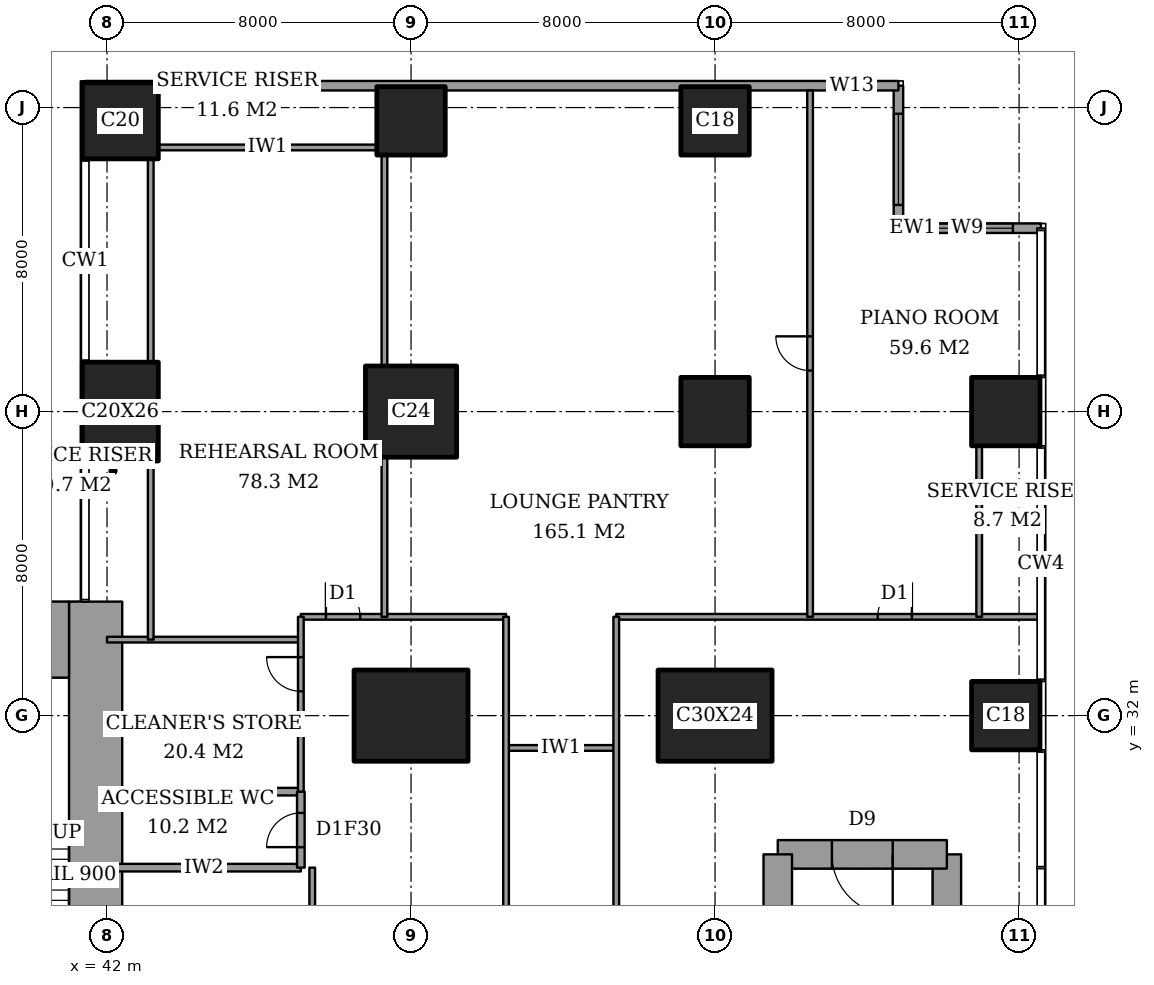
"""IFC4 building model, lengths in metres.
Left out: names, types, materials, properties, quantities, classifications, styles, units other than length and angle.
Written with IfcOpenShell. Run it as: python <this file> out.ifc"""

import sys

from ifc_helpers import new_model, si_unit, direction, frame, frame_2d, origin, origin_2d, place, context, subcontext, project, spatial, rectangle, extrude, element, fill, save


model = new_model("IFC4")
c1 = context("Model", 3, precision=1e-05, world=origin(), true_north=direction((0.0, 1.0)))
c2 = subcontext(c1, "Body", "Model", "MODEL_VIEW")
j1 = project(units=[si_unit("LENGTHUNIT", "METRE"), si_unit("PLANEANGLEUNIT", "RADIAN")], contexts=[c1])
p1 = place(None, origin())
s1 = spatial("IfcSite", under=j1, at=p1, CompositionType="ELEMENT")
p2 = place(p1, origin())
s2 = spatial("IfcBuilding", under=s1, at=p2, CompositionType="ELEMENT")
p3 = place(p2, frame((0.0, 0.0, 200.2)))
s3 = spatial("IfcBuildingStorey", under=s2, at=p3, CompositionType="ELEMENT", Elevation=200.2)
p4 = place(p3, frame((42.35, 40.0, 0.0), z_axis=(0.0, 0.0, 1.0), x_axis=(1.0, 0.0, 0.0)))
e1 = element("IfcColumn", 1, at=p4, inside=s3, PredefinedType="COLUMN", context=c2, shape_type="SweptSolid", body=[
    extrude(rectangle(XDim=2.0, YDim=2.6, at=origin_2d()), origin(), (0.0, 0.0, 1.0), 3.6),
])
p5 = place(p3, frame((42.35, 47.65, 0.0), z_axis=(0.0, 0.0, 1.0), x_axis=(1.0, 0.0, 0.0)))
e2 = element("IfcColumn", 2, at=p5, inside=s3, PredefinedType="COLUMN", context=c2, shape_type="SweptSolid", body=[
    extrude(rectangle(XDim=2.0, YDim=2.0, at=origin_2d()), origin(), (0.0, 0.0, 1.0), 3.6),
])
p6 = place(p3, frame((50.0, 32.0, 0.0), z_axis=(0.0, 0.0, 1.0), x_axis=(1.0, 0.0, 0.0)))
e3 = element("IfcColumn", 3, at=p6, inside=s3, PredefinedType="COLUMN", context=c2, shape_type="SweptSolid", body=[
    extrude(rectangle(XDim=3.0, YDim=2.4, at=origin_2d()), origin(), (0.0, 0.0, 1.0), 3.6),
])
p7 = place(p3, frame((50.0, 40.0, 0.0), z_axis=(0.0, 0.0, 1.0), x_axis=(1.0, 0.0, 0.0)))
e4 = element("IfcColumn", 4, at=p7, inside=s3, PredefinedType="COLUMN", context=c2, shape_type="SweptSolid", body=[
    extrude(rectangle(XDim=2.4, YDim=2.4, at=origin_2d()), origin(), (0.0, 0.0, 1.0), 3.6),
])
p8 = place(p3, frame((50.0, 47.65, 0.0), z_axis=(0.0, 0.0, 1.0), x_axis=(1.0, 0.0, 0.0)))
e5 = element("IfcColumn", 5, at=p8, inside=s3, PredefinedType="COLUMN", context=c2, shape_type="SweptSolid", body=[
    extrude(rectangle(XDim=1.8, YDim=1.8, at=origin_2d()), origin(), (0.0, 0.0, 1.0), 3.6),
])
p9 = place(p3, frame((58.0, 32.0, 0.0), z_axis=(0.0, 0.0, 1.0), x_axis=(1.0, 0.0, 0.0)))
e6 = element("IfcColumn", 6, at=p9, inside=s3, PredefinedType="COLUMN", context=c2, shape_type="SweptSolid", body=[
    extrude(rectangle(XDim=3.0, YDim=2.4, at=origin_2d()), origin(), (0.0, 0.0, 1.0), 3.6),
])
for number, where, z_axis, x_axis in (
    (7, (58.0, 40.0, 0.0), (0.0, 0.0, 1.0), (1.0, 0.0, 0.0)),
    (8, (58.0, 47.65, 0.0), (0.0, 0.0, 1.0), (1.0, 0.0, 0.0)),
    (9, (65.65, 32.0, 0.0), (0.0, 0.0, 1.0), (1.0, 0.0, 0.0)),
    (10, (65.65, 40.0, 0.0), (0.0, 0.0, 1.0), (1.0, 0.0, 0.0)),
):
    element("IfcColumn", number, at=place(p3, frame(where, z_axis=z_axis, x_axis=x_axis)), inside=s3, PredefinedType="COLUMN", context=c2, shape_type="SweptSolid", body=[
        extrude(rectangle(XDim=1.8, YDim=1.8, at=origin_2d()), origin(), (0.0, 0.0, 1.0), 3.6),
    ])
p10 = place(p3, frame((37.85, 34.0, 0.0), z_axis=(0.0, 0.0, 1.0), x_axis=(1.0, 0.0, 0.0)))
e11 = element("IfcWall", 11, at=p10, inside=s3, PredefinedType="SHEAR", context=c2, shape_type="SweptSolid", body=[
    extrude(rectangle(XDim=3.15, YDim=2.0, at=frame_2d((1.575, 0.0))), origin(), (0.0, 0.0, 1.0), 3.6),
])
p11 = place(p3, frame((41.7, 24.85, 0.0), z_axis=(0.0, 0.0, 1.0), x_axis=(0.0, 1.0, 0.0)))
e12 = element("IfcWall", 12, at=p11, inside=s3, PredefinedType="SHEAR", context=c2, shape_type="SweptSolid", body=[
    extrude(rectangle(XDim=10.15, YDim=1.4, at=frame_2d((5.075, 0.0))), origin(), (0.0, 0.0, 1.0), 3.6),
])
p12 = place(p3, frame((64.1, 19.65, 0.0), z_axis=(0.0, 0.0, 1.0), x_axis=(0.0, 1.0, 0.0)))
e13 = element("IfcWall", 13, at=p12, inside=s3, PredefinedType="SHEAR", context=c2, shape_type="SweptSolid", body=[
    extrude(rectangle(XDim=8.7, YDim=0.75, at=frame_2d((4.35, 0.0))), origin(), (0.0, 0.0, 1.0), 3.6),
])
p13 = place(p3, frame((64.1, 28.35, 0.0), z_axis=(0.0, 0.0, 1.0), x_axis=(-1.0, 0.0, 0.0)))
e14 = element("IfcWall", 14, at=p13, inside=s3, PredefinedType="SHEAR", context=c2, shape_type="SweptSolid", body=[
    extrude(rectangle(XDim=4.45, YDim=0.75, at=frame_2d((2.225, 0.0))), origin(), (0.0, 0.0, 1.0), 3.6),
])
p14 = place(p13, frame((1.425, 0.0, 0.0)))
e15 = element("IfcOpeningElement", 15, at=p14, cuts=e14, PredefinedType="OPENING", context=c2, shape_type="SweptSolid", body=[
    extrude(rectangle(XDim=1.6, YDim=2.1, at=frame_2d((0.8, 1.05))), frame((0.0, 0.385, 0.0), z_axis=(0.0, -1.0, 0.0), x_axis=(1.0, 0.0, 0.0)), (0.0, 0.0, 1.0), 0.77),
])
p15 = place(p3, frame((59.65, 28.35, 0.0), z_axis=(0.0, 0.0, 1.0), x_axis=(0.0, -1.0, 0.0)))
e16 = element("IfcWall", 16, at=p15, inside=s3, PredefinedType="SHEAR", context=c2, shape_type="SweptSolid", body=[
    extrude(rectangle(XDim=8.7, YDim=0.75, at=frame_2d((4.35, 0.0))), origin(), (0.0, 0.0, 1.0), 3.6),
])
p16 = place(p3, frame((66.575, 44.825, 0.0), z_axis=(0.0, 0.0, 1.0), x_axis=(-1.0, 0.0, 0.0)))
e17 = element("IfcWall", 17, at=p16, inside=s3, PredefinedType="SOLIDWALL", context=c2, shape_type="SweptSolid", body=[
    extrude(rectangle(XDim=3.75, YDim=0.25, at=frame_2d((1.875, 0.0))), origin(), (0.0, 0.0, 1.0), 3.6),
])
p17 = place(p16, frame((0.738, 0.0, 0.2)))
e18 = element("IfcOpeningElement", 18, at=p17, cuts=e17, PredefinedType="OPENING", context=c2, shape_type="SweptSolid", body=[
    extrude(rectangle(XDim=2.4, YDim=2.4, at=frame_2d((1.2, 1.2))), frame((0.0, 0.135, 0.0), z_axis=(0.0, -1.0, 0.0), x_axis=(1.0, 0.0, 0.0)), (0.0, 0.0, 1.0), 0.27),
])
p18 = place(p3, frame((62.825, 44.825, 0.0), z_axis=(0.0, 0.0, 1.0), x_axis=(0.0, 1.0, 0.0)))
e19 = element("IfcWall", 19, at=p18, inside=s3, PredefinedType="SOLIDWALL", context=c2, shape_type="SweptSolid", body=[
    extrude(rectangle(XDim=3.75, YDim=0.25, at=frame_2d((1.875, 0.0))), origin(), (0.0, 0.0, 1.0), 3.6),
])
p19 = place(p18, frame((0.613, 0.0, 0.2)))
e20 = element("IfcOpeningElement", 20, at=p19, cuts=e19, PredefinedType="OPENING", context=c2, shape_type="SweptSolid", body=[
    extrude(rectangle(XDim=2.4, YDim=2.4, at=frame_2d((1.2, 1.2))), frame((0.0, 0.135, 0.0), z_axis=(0.0, -1.0, 0.0), x_axis=(1.0, 0.0, 0.0)), (0.0, 0.0, 1.0), 0.27),
])
p20 = place(p3, frame((62.825, 48.575, 0.0), z_axis=(0.0, 0.0, 1.0), x_axis=(-1.0, 0.0, 0.0)))
e21 = element("IfcWall", 21, at=p20, inside=s3, PredefinedType="SOLIDWALL", context=c2, shape_type="SweptSolid", body=[
    extrude(rectangle(XDim=21.4, YDim=0.25, at=frame_2d((10.7, 0.0))), origin(), (0.0, 0.0, 1.0), 3.6),
])
p21 = place(p20, frame((0.625, 0.0, 0.2)))
e22 = element("IfcOpeningElement", 22, at=p21, cuts=e21, PredefinedType="OPENING", context=c2, shape_type="SweptSolid", body=[
    extrude(rectangle(XDim=1.2, YDim=2.4, at=frame_2d((0.6, 1.2))), frame((0.0, 0.135, 0.0), z_axis=(0.0, -1.0, 0.0), x_axis=(1.0, 0.0, 0.0)), (0.0, 0.0, 1.0), 0.27),
])
for number, where, z_axis, x_axis in (
    (23, (42.0, 28.0, 0.0), (0.0, 0.0, 1.0), (1.0, 0.0, 0.0)),
    (24, (42.0, 30.0, 0.0), (0.0, 0.0, 1.0), (1.0, 0.0, 0.0)),
):
    element("IfcWall", number, at=place(p3, frame(where, z_axis=z_axis, x_axis=x_axis)), inside=s3, PredefinedType="PARTITIONING", context=c2, shape_type="SweptSolid", body=[
        extrude(rectangle(XDim=5.1, YDim=0.2, at=frame_2d((2.55, 0.0))), origin(), (0.0, 0.0, 1.0), 3.35),
    ])
p22 = place(p3, frame((52.5, 31.15, 0.0), z_axis=(0.0, 0.0, 1.0), x_axis=(1.0, 0.0, 0.0)))
e25 = element("IfcWall", 25, at=p22, inside=s3, PredefinedType="PARTITIONING", context=c2, shape_type="SweptSolid", body=[
    extrude(rectangle(XDim=2.9, YDim=0.15, at=frame_2d((1.45, 0.0))), origin(), (0.0, 0.0, 1.0), 3.35),
])
p23 = place(p3, frame((42.0, 34.0, 0.0), z_axis=(0.0, 0.0, 1.0), x_axis=(1.0, 0.0, 0.0)))
e26 = element("IfcWall", 26, at=p23, inside=s3, PredefinedType="PARTITIONING", context=c2, shape_type="SweptSolid", body=[
    extrude(rectangle(XDim=5.1, YDim=0.15, at=frame_2d((2.55, 0.0))), origin(), (0.0, 0.0, 1.0), 3.35),
])
p24 = place(p3, frame((47.1, 34.6, 0.0), z_axis=(0.0, 0.0, 1.0), x_axis=(1.0, 0.0, 0.0)))
e27 = element("IfcWall", 27, at=p24, inside=s3, PredefinedType="PARTITIONING", context=c2, shape_type="SweptSolid", body=[
    extrude(rectangle(XDim=5.4, YDim=0.15, at=frame_2d((2.7, 0.0))), origin(), (0.0, 0.0, 1.0), 3.35),
])
p25 = place(p24, frame((0.66, 0.0, 0.0)))
e28 = element("IfcOpeningElement", 28, at=p25, cuts=e27, PredefinedType="OPENING", context=c2, shape_type="SweptSolid", body=[
    extrude(rectangle(XDim=0.9, YDim=2.1, at=frame_2d((0.45, 1.05))), frame((0.0, 0.085, 0.0), z_axis=(0.0, -1.0, 0.0), x_axis=(1.0, 0.0, 0.0)), (0.0, 0.0, 1.0), 0.17),
])
p26 = place(p3, frame((55.4, 34.6, 0.0), z_axis=(0.0, 0.0, 1.0), x_axis=(1.0, 0.0, 0.0)))
e29 = element("IfcWall", 29, at=p26, inside=s3, PredefinedType="PARTITIONING", context=c2, shape_type="SweptSolid", body=[
    extrude(rectangle(XDim=11.161, YDim=0.15, at=frame_2d((5.581, 0.0))), origin(), (0.0, 0.0, 1.0), 3.35),
])
p27 = place(p26, frame((6.88, 0.0, 0.0)))
e30 = element("IfcOpeningElement", 30, at=p27, cuts=e29, PredefinedType="OPENING", context=c2, shape_type="SweptSolid", body=[
    extrude(rectangle(XDim=0.9, YDim=2.1, at=frame_2d((0.45, 1.05))), frame((0.0, 0.085, 0.0), z_axis=(0.0, -1.0, 0.0), x_axis=(1.0, 0.0, 0.0)), (0.0, 0.0, 1.0), 0.17),
])
p28 = place(p3, frame((43.35, 46.95, 0.0), z_axis=(0.0, 0.0, 1.0), x_axis=(1.0, 0.0, 0.0)))
e31 = element("IfcWall", 31, at=p28, inside=s3, PredefinedType="PARTITIONING", context=c2, shape_type="SweptSolid", body=[
    extrude(rectangle(XDim=5.75, YDim=0.15, at=frame_2d((2.875, 0.0))), origin(), (0.0, 0.0, 1.0), 3.35),
])
p29 = place(p3, frame((43.15, 34.0, 0.0), z_axis=(0.0, 0.0, 1.0), x_axis=(0.0, 1.0, 0.0)))
e32 = element("IfcWall", 32, at=p29, inside=s3, PredefinedType="PARTITIONING", context=c2, shape_type="SweptSolid", body=[
    extrude(rectangle(XDim=4.7, YDim=0.15, at=frame_2d((2.35, 0.0))), origin(), (0.0, 0.0, 1.0), 3.35),
])
p30 = place(p3, frame((43.15, 41.3, 0.0), z_axis=(0.0, 0.0, 1.0), x_axis=(0.0, 1.0, 0.0)))
e33 = element("IfcWall", 33, at=p30, inside=s3, PredefinedType="PARTITIONING", context=c2, shape_type="SweptSolid", body=[
    extrude(rectangle(XDim=5.35, YDim=0.15, at=frame_2d((2.675, 0.0))), origin(), (0.0, 0.0, 1.0), 3.35),
])
p31 = place(p3, frame((47.1, 28.0, 0.0), z_axis=(0.0, 0.0, 1.0), x_axis=(0.0, 1.0, 0.0)))
e34 = element("IfcWall", 34, at=p31, inside=s3, PredefinedType="PARTITIONING", context=c2, shape_type="SweptSolid", body=[
    extrude(rectangle(XDim=2.0, YDim=0.2, at=frame_2d((1.0, 0.0))), origin(), (0.0, 0.0, 1.0), 3.35),
])
p32 = place(p31, frame((0.54, 0.0, 0.0)))
e35 = element("IfcOpeningElement", 35, at=p32, cuts=e34, PredefinedType="OPENING", context=c2, shape_type="SweptSolid", body=[
    extrude(rectangle(XDim=0.9, YDim=2.1, at=frame_2d((0.45, 1.05))), frame((0.0, 0.11, 0.0), z_axis=(0.0, -1.0, 0.0), x_axis=(1.0, 0.0, 0.0)), (0.0, 0.0, 1.0), 0.22),
])
p33 = place(p3, frame((47.1, 30.0, 0.0), z_axis=(0.0, 0.0, 1.0), x_axis=(0.0, 1.0, 0.0)))
e36 = element("IfcWall", 36, at=p33, inside=s3, PredefinedType="PARTITIONING", context=c2, shape_type="SweptSolid", body=[
    extrude(rectangle(XDim=4.6, YDim=0.15, at=frame_2d((2.3, 0.0))), origin(), (0.0, 0.0, 1.0), 3.35),
])
p34 = place(p33, frame((2.64, 0.0, 0.0)))
e37 = element("IfcOpeningElement", 37, at=p34, cuts=e36, PredefinedType="OPENING", context=c2, shape_type="SweptSolid", body=[
    extrude(rectangle(XDim=0.9, YDim=2.1, at=frame_2d((0.45, 1.05))), frame((0.0, 0.085, 0.0), z_axis=(0.0, -1.0, 0.0), x_axis=(1.0, 0.0, 0.0)), (0.0, 0.0, 1.0), 0.17),
])
p35 = place(p3, frame((47.4, 20.0, 0.0), z_axis=(0.0, 0.0, 1.0), x_axis=(0.0, 1.0, 0.0)))
e38 = element("IfcWall", 38, at=p35, inside=s3, PredefinedType="PARTITIONING", context=c2, shape_type="SweptSolid", body=[
    extrude(rectangle(XDim=8.0, YDim=0.15, at=frame_2d((4.0, 0.0))), origin(), (0.0, 0.0, 1.0), 3.35),
])
p36 = place(p35, frame((3.5, 0.0, 0.0)))
e39 = element("IfcOpeningElement", 39, at=p36, cuts=e38, PredefinedType="OPENING", context=c2, shape_type="SweptSolid", body=[
    extrude(rectangle(XDim=1.0, YDim=2.1, at=frame_2d((0.5, 1.05))), frame((0.0, 0.085, 0.0), z_axis=(0.0, -1.0, 0.0), x_axis=(1.0, 0.0, 0.0)), (0.0, 0.0, 1.0), 0.17),
])
p37 = place(p3, frame((49.3, 34.6, 0.0), z_axis=(0.0, 0.0, 1.0), x_axis=(0.0, 1.0, 0.0)))
e40 = element("IfcWall", 40, at=p37, inside=s3, PredefinedType="PARTITIONING", context=c2, shape_type="SweptSolid", body=[
    extrude(rectangle(XDim=4.2, YDim=0.15, at=frame_2d((2.1, 0.0))), origin(), (0.0, 0.0, 1.0), 3.35),
])
p38 = place(p3, frame((49.3, 41.2, 0.0), z_axis=(0.0, 0.0, 1.0), x_axis=(0.0, 1.0, 0.0)))
e41 = element("IfcWall", 41, at=p38, inside=s3, PredefinedType="PARTITIONING", context=c2, shape_type="SweptSolid", body=[
    extrude(rectangle(XDim=5.55, YDim=0.15, at=frame_2d((2.775, 0.0))), origin(), (0.0, 0.0, 1.0), 3.35),
])
p39 = place(p3, frame((52.5, 13.4, 0.0), z_axis=(0.0, 0.0, 1.0), x_axis=(0.0, 1.0, 0.0)))
e42 = element("IfcWall", 42, at=p39, inside=s3, PredefinedType="PARTITIONING", context=c2, shape_type="SweptSolid", body=[
    extrude(rectangle(XDim=21.2, YDim=0.15, at=frame_2d((10.6, 0.0))), origin(), (0.0, 0.0, 1.0), 3.35),
])
p40 = place(p39, frame((10.15, 0.0, 0.0)))
e43 = element("IfcOpeningElement", 43, at=p40, cuts=e42, PredefinedType="OPENING", context=c2, shape_type="SweptSolid", body=[
    extrude(rectangle(XDim=0.9, YDim=2.1, at=frame_2d((0.45, 1.05))), frame((0.0, 0.085, 0.0), z_axis=(0.0, -1.0, 0.0), x_axis=(1.0, 0.0, 0.0)), (0.0, 0.0, 1.0), 0.17),
])
p41 = place(p3, frame((55.4, 13.4, 0.0), z_axis=(0.0, 0.0, 1.0), x_axis=(0.0, 1.0, 0.0)))
e44 = element("IfcWall", 44, at=p41, inside=s3, PredefinedType="PARTITIONING", context=c2, shape_type="SweptSolid", body=[
    extrude(rectangle(XDim=21.2, YDim=0.15, at=frame_2d((10.6, 0.0))), origin(), (0.0, 0.0, 1.0), 3.35),
])
p42 = place(p41, frame((10.09, 0.0, 0.0)))
e45 = element("IfcOpeningElement", 45, at=p42, cuts=e44, PredefinedType="OPENING", context=c2, shape_type="SweptSolid", body=[
    extrude(rectangle(XDim=1.0, YDim=2.1, at=frame_2d((0.5, 1.05))), frame((0.0, 0.085, 0.0), z_axis=(0.0, -1.0, 0.0), x_axis=(1.0, 0.0, 0.0)), (0.0, 0.0, 1.0), 0.17),
])
p43 = place(p3, frame((60.5, 34.6, 0.0), z_axis=(0.0, 0.0, 1.0), x_axis=(0.0, 1.0, 0.0)))
e46 = element("IfcWall", 46, at=p43, inside=s3, PredefinedType="PARTITIONING", context=c2, shape_type="SweptSolid", body=[
    extrude(rectangle(XDim=13.85, YDim=0.15, at=frame_2d((6.925, 0.0))), origin(), (0.0, 0.0, 1.0), 3.35),
])
p44 = place(p43, frame((6.48, 0.0, 0.0)))
e47 = element("IfcOpeningElement", 47, at=p44, cuts=e46, PredefinedType="OPENING", context=c2, shape_type="SweptSolid", body=[
    extrude(rectangle(XDim=0.9, YDim=2.1, at=frame_2d((0.45, 1.05))), frame((0.0, 0.085, 0.0), z_axis=(0.0, -1.0, 0.0), x_axis=(1.0, 0.0, 0.0)), (0.0, 0.0, 1.0), 0.17),
])
p45 = place(p3, frame((64.95, 34.6, 0.0), z_axis=(0.0, 0.0, 1.0), x_axis=(0.0, 1.0, 0.0)))
e48 = element("IfcWall", 48, at=p45, inside=s3, PredefinedType="PARTITIONING", context=c2, shape_type="SweptSolid", body=[
    extrude(rectangle(XDim=4.5, YDim=0.15, at=frame_2d((2.25, 0.0))), origin(), (0.0, 0.0, 1.0), 3.35),
])
p46 = place(p17, origin())
e49 = element("IfcWindow", 49, at=p46, inside=s3, PartitioningType="SINGLE_PANEL", PredefinedType="WINDOW", context=c2, shape_type="SweptSolid", body=[
    extrude(rectangle(XDim=2.4, YDim=2.4, at=frame_2d((1.2, 1.2))), frame((0.0, 0.03, 0.0), z_axis=(0.0, -1.0, 0.0), x_axis=(1.0, 0.0, 0.0)), (0.0, 0.0, 1.0), 0.06),
])
fill(e18, e49)
p47 = place(p19, origin())
e50 = element("IfcWindow", 50, at=p47, inside=s3, PartitioningType="SINGLE_PANEL", PredefinedType="WINDOW", context=c2, shape_type="SweptSolid", body=[
    extrude(rectangle(XDim=2.4, YDim=2.4, at=frame_2d((1.2, 1.2))), frame((0.0, 0.03, 0.0), z_axis=(0.0, -1.0, 0.0), x_axis=(1.0, 0.0, 0.0)), (0.0, 0.0, 1.0), 0.06),
])
fill(e20, e50)
p48 = place(p21, origin())
e51 = element("IfcWindow", 51, at=p48, inside=s3, PartitioningType="SINGLE_PANEL", PredefinedType="WINDOW", context=c2, shape_type="SweptSolid", body=[
    extrude(rectangle(XDim=1.2, YDim=2.4, at=frame_2d((0.6, 1.2))), frame((0.0, 0.03, 0.0), z_axis=(0.0, -1.0, 0.0), x_axis=(1.0, 0.0, 0.0)), (0.0, 0.0, 1.0), 0.06),
])
fill(e22, e51)
p49 = place(p32, origin())
e52 = element("IfcDoor", 52, at=p49, inside=s3, OperationType="SINGLE_SWING_RIGHT", PredefinedType="DOOR", context=c2, shape_type="SweptSolid", body=[
    extrude(rectangle(XDim=0.9, YDim=2.1, at=frame_2d((0.45, 1.05))), frame((0.0, 0.025, 0.0), z_axis=(0.0, -1.0, 0.0), x_axis=(1.0, 0.0, 0.0)), (0.0, 0.0, 1.0), 0.05),
])
fill(e35, e52)
p50 = place(p34, origin())
e53 = element("IfcDoor", 53, at=p50, inside=s3, OperationType="SINGLE_SWING_LEFT", PredefinedType="DOOR", context=c2, shape_type="SweptSolid", body=[
    extrude(rectangle(XDim=0.9, YDim=2.1, at=frame_2d((0.45, 1.05))), frame((0.0, 0.025, 0.0), z_axis=(0.0, -1.0, 0.0), x_axis=(1.0, 0.0, 0.0)), (0.0, 0.0, 1.0), 0.05),
])
fill(e37, e53)
p51 = place(p27, origin())
e54 = element("IfcDoor", 54, at=p51, inside=s3, OperationType="SINGLE_SWING_LEFT", PredefinedType="DOOR", context=c2, shape_type="SweptSolid", body=[
    extrude(rectangle(XDim=0.9, YDim=2.1, at=frame_2d((0.45, 1.05))), frame((0.0, 0.025, 0.0), z_axis=(0.0, -1.0, 0.0), x_axis=(1.0, 0.0, 0.0)), (0.0, 0.0, 1.0), 0.05),
])
fill(e30, e54)
p52 = place(p44, origin())
e55 = element("IfcDoor", 55, at=p52, inside=s3, OperationType="SINGLE_SWING_LEFT", PredefinedType="DOOR", context=c2, shape_type="SweptSolid", body=[
    extrude(rectangle(XDim=0.9, YDim=2.1, at=frame_2d((0.45, 1.05))), frame((0.0, 0.025, 0.0), z_axis=(0.0, -1.0, 0.0), x_axis=(1.0, 0.0, 0.0)), (0.0, 0.0, 1.0), 0.05),
])
fill(e47, e55)
p53 = place(p25, origin())
e56 = element("IfcDoor", 56, at=p53, inside=s3, OperationType="SINGLE_SWING_RIGHT", PredefinedType="DOOR", context=c2, shape_type="SweptSolid", body=[
    extrude(rectangle(XDim=0.9, YDim=2.1, at=frame_2d((0.45, 1.05))), frame((0.0, 0.025, 0.0), z_axis=(0.0, -1.0, 0.0), x_axis=(1.0, 0.0, 0.0)), (0.0, 0.0, 1.0), 0.05),
])
fill(e28, e56)
p54 = place(p14, origin())
e57 = element("IfcDoor", 57, at=p54, inside=s3, OperationType="DOUBLE_DOOR_SINGLE_SWING", PredefinedType="DOOR", context=c2, shape_type="SweptSolid", body=[
    extrude(rectangle(XDim=1.6, YDim=2.1, at=frame_2d((0.8, 1.05))), frame((0.0, 0.025, 0.0), z_axis=(0.0, -1.0, 0.0), x_axis=(1.0, 0.0, 0.0)), (0.0, 0.0, 1.0), 0.05),
])
fill(e15, e57)
save(model, sys.argv[1])
